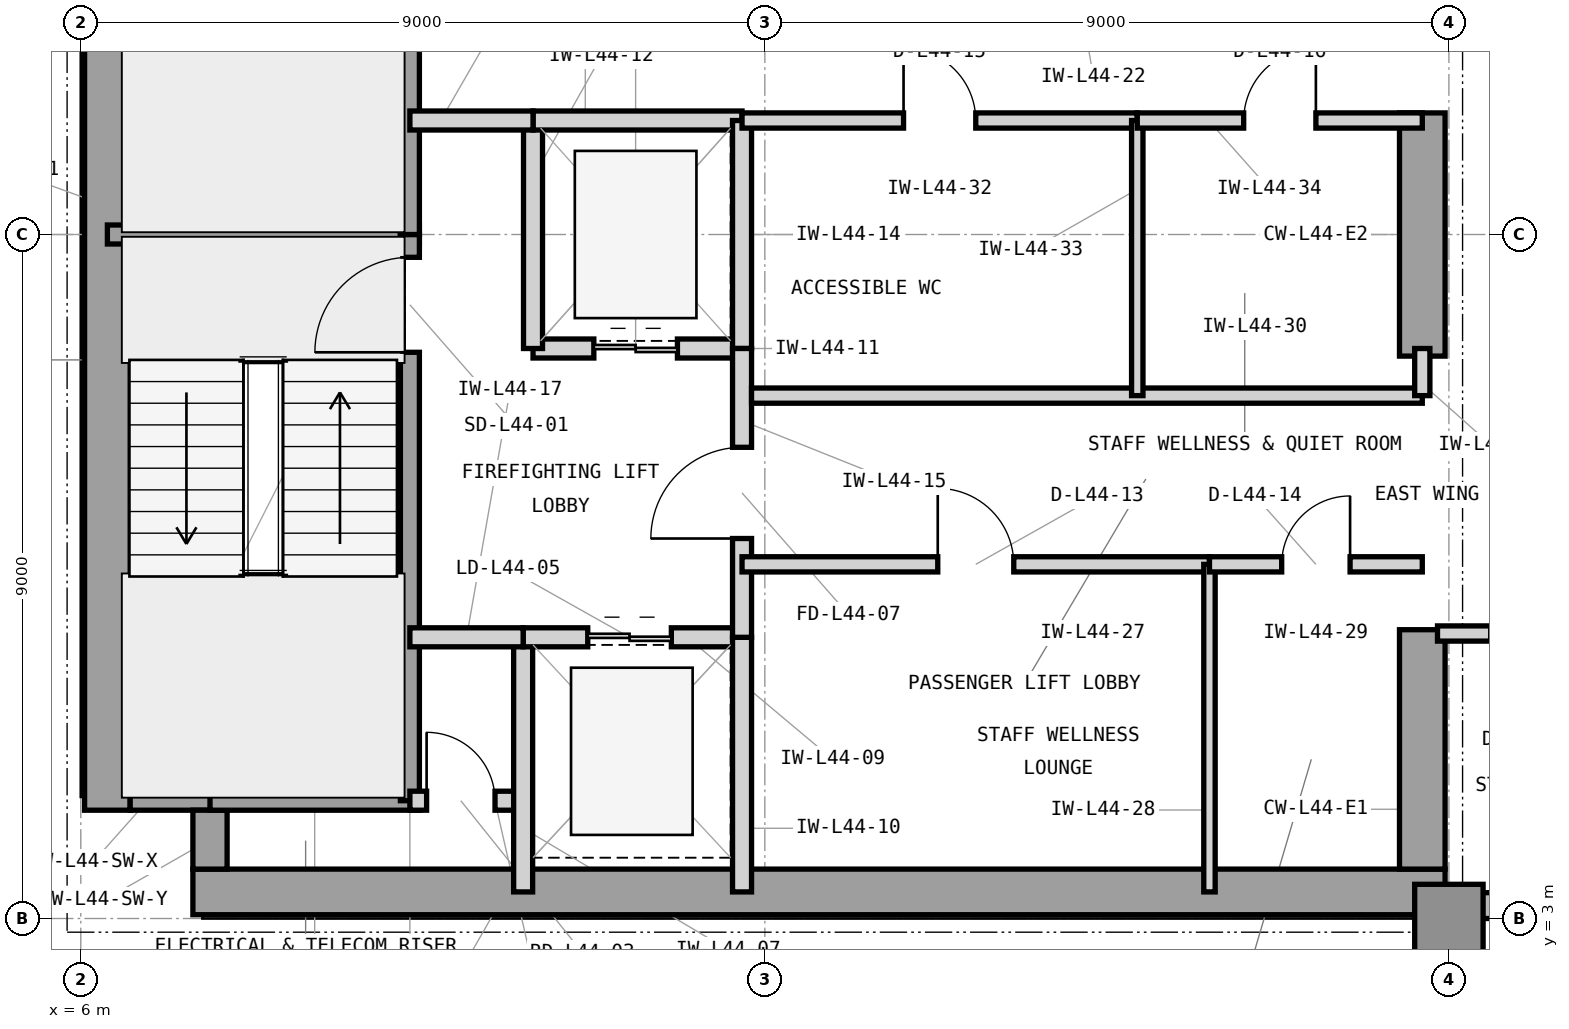
"""IFC4 building model, lengths in metres.
Left out: names, types, materials, properties, quantities, classifications, styles, units other than length and angle.
Written with IfcOpenShell. Run it as: python <this file> out.ifc"""

import sys

from ifc_helpers import new_model, si_unit, direction, frame, frame_2d, origin, origin_2d, place, context, subcontext, project, spatial, rectangle, extrude, element, fill, save


model = new_model("IFC4")
c1 = context("Model", 3, precision=1e-05, world=origin(), true_north=direction((0.0, 1.0)))
c2 = subcontext(c1, "Body", "Model", "MODEL_VIEW")
j1 = project(units=[si_unit("LENGTHUNIT", "METRE"), si_unit("PLANEANGLEUNIT", "RADIAN")], contexts=[c1])
p1 = place(None, origin())
s1 = spatial("IfcSite", under=j1, at=p1, CompositionType="ELEMENT")
p2 = place(p1, origin())
s2 = spatial("IfcBuilding", under=s1, at=p2, CompositionType="ELEMENT")
p3 = place(p2, frame((0.0, 0.0, 183.9)))
s3 = spatial("IfcBuildingStorey", under=s2, at=p3, CompositionType="ELEMENT", Elevation=183.9)
p4 = place(p3, frame((7.475, 3.35, 0.0), z_axis=(0.0, 0.0, 1.0), x_axis=(1.0, 0.0, 0.0)))
e1 = element("IfcWall", 1, at=p4, inside=s3, PredefinedType="SHEAR", context=c2, shape_type="SweptSolid", body=[
    extrude(rectangle(XDim=16.475, YDim=0.6, at=frame_2d((8.237, 0.0))), origin(), (0.0, 0.0, 1.0), 3.9),
])
p5 = place(p3, frame((6.35, 4.425, 0.0), z_axis=(0.0, 0.0, 1.0), x_axis=(0.0, 1.0, 0.0)))
e2 = element("IfcWall", 2, at=p5, inside=s3, PredefinedType="SHEAR", context=c2, shape_type="SweptSolid", body=[
    extrude(rectangle(XDim=15.15, YDim=0.6, at=frame_2d((7.575, 0.0))), origin(), (0.0, 0.0, 1.0), 3.9),
])
p6 = place(p3, frame((23.65, 3.65, 0.0), z_axis=(0.0, 0.0, 1.0), x_axis=(0.0, 1.0, 0.0)))
e3 = element("IfcWall", 3, at=p6, inside=s3, PredefinedType="SHEAR", context=c2, shape_type="SweptSolid", body=[
    extrude(rectangle(XDim=3.15, YDim=0.6, at=frame_2d((1.575, 0.0))), origin(), (0.0, 0.0, 1.0), 3.9),
])
p7 = place(p3, frame((23.65, 10.4, 0.0), z_axis=(0.0, 0.0, 1.0), x_axis=(0.0, 1.0, 0.0)))
e4 = element("IfcWall", 4, at=p7, inside=s3, PredefinedType="SHEAR", context=c2, shape_type="SweptSolid", body=[
    extrude(rectangle(XDim=3.2, YDim=0.6, at=frame_2d((1.6, 0.0))), origin(), (0.0, 0.0, 1.0), 3.9),
])
p8 = place(p3, frame((6.65, 4.65, 0.0), z_axis=(0.0, 0.0, 1.0), x_axis=(1.0, 0.0, 0.0)))
e5 = element("IfcWall", 5, at=p8, inside=s3, PredefinedType="SHEAR", context=c2, shape_type="SweptSolid", body=[
    extrude(rectangle(XDim=1.275, YDim=0.45, at=frame_2d((0.638, 0.0))), origin(), (0.0, 0.0, 1.0), 3.9),
])
p9 = place(p3, frame((7.7, 3.65, 0.0), z_axis=(0.0, 0.0, 1.0), x_axis=(0.0, 1.0, 0.0)))
e6 = element("IfcWall", 6, at=p9, inside=s3, PredefinedType="SHEAR", context=c2, shape_type="SweptSolid", body=[
    extrude(rectangle(XDim=0.775, YDim=0.45, at=frame_2d((0.388, 0.0))), origin(), (0.0, 0.0, 1.0), 3.9),
])
p10 = place(p3, frame((24.0, 3.0, 0.0), z_axis=(0.0, 0.0, 1.0), x_axis=(1.0, 0.0, 0.0)))
e7 = element("IfcColumn", 7, at=p10, inside=s3, PredefinedType="COLUMN", context=c2, shape_type="SweptSolid", body=[
    extrude(rectangle(XDim=0.9, YDim=0.9, at=origin_2d()), origin(), (0.0, 0.0, 1.0), 3.9),
])
p11 = place(p3, frame((23.9, 3.17, 0.0), z_axis=(0.0, 0.0, 1.0), x_axis=(1.0, 0.0, 0.0)))
e8 = element("IfcWall", 8, at=p11, inside=s3, PredefinedType="STANDARD", context=c2, shape_type="SweptSolid", body=[
    extrude(rectangle(XDim=31.5, YDim=0.34, at=frame_2d((15.75, 0.0))), origin(), (0.0, 0.0, 1.0), 3.7),
])
p12 = place(p11, frame((5.6, 0.0, 0.9)))
e9 = element("IfcOpeningElement", 9, at=p12, cuts=e8, PredefinedType="OPENING", context=c2, shape_type="SweptSolid", body=[
    extrude(rectangle(XDim=2.3, YDim=2.2, at=frame_2d((1.15, 1.1))), frame((0.0, 0.18, 0.0), z_axis=(0.0, -1.0, 0.0), x_axis=(1.0, 0.0, 0.0)), (0.0, 0.0, 1.0), 0.36),
])
p13 = place(p11, frame((14.6, 0.0, 0.9)))
e10 = element("IfcOpeningElement", 10, at=p13, cuts=e8, PredefinedType="OPENING", context=c2, shape_type="SweptSolid", body=[
    extrude(rectangle(XDim=2.3, YDim=2.2, at=frame_2d((1.15, 1.1))), frame((0.0, 0.18, 0.0), z_axis=(0.0, -1.0, 0.0), x_axis=(1.0, 0.0, 0.0)), (0.0, 0.0, 1.0), 0.36),
])
p14 = place(p11, frame((19.1, 0.0, 0.9)))
e11 = element("IfcOpeningElement", 11, at=p14, cuts=e8, PredefinedType="OPENING", context=c2, shape_type="SweptSolid", body=[
    extrude(rectangle(XDim=2.3, YDim=2.2, at=frame_2d((1.15, 1.1))), frame((0.0, 0.18, 0.0), z_axis=(0.0, -1.0, 0.0), x_axis=(1.0, 0.0, 0.0)), (0.0, 0.0, 1.0), 0.36),
])
p15 = place(p11, frame((0.9, 0.0, 0.9)))
e12 = element("IfcOpeningElement", 12, at=p15, cuts=e8, PredefinedType="OPENING", context=c2, shape_type="SweptSolid", body=[
    extrude(rectangle(XDim=1.6, YDim=2.2, at=frame_2d((0.8, 1.1))), frame((0.0, 0.18, 0.0), z_axis=(0.0, -1.0, 0.0), x_axis=(1.0, 0.0, 0.0)), (0.0, 0.0, 1.0), 0.36),
])
p16 = place(p3, frame((6.35, 12.0, 0.0), z_axis=(0.0, 0.0, 1.0), x_axis=(1.0, 0.0, 0.0)))
e13 = element("IfcWall", 13, at=p16, inside=s3, PredefinedType="SHEAR", context=c2, shape_type="SweptSolid", body=[
    extrude(rectangle(XDim=4.105, YDim=0.25, at=frame_2d((2.052, 0.0))), origin(), (0.0, 0.0, 1.0), 3.9),
])
p17 = place(p3, frame((7.7, 4.55, 0.0), z_axis=(0.0, 0.0, 1.0), x_axis=(1.0, 0.0, 0.0)))
e14 = element("IfcWall", 14, at=p17, inside=s3, PredefinedType="SHEAR", context=c2, shape_type="SweptSolid", body=[
    extrude(rectangle(XDim=2.755, YDim=0.25, at=frame_2d((1.377, 0.0))), origin(), (0.0, 0.0, 1.0), 3.9),
])
p18 = place(p3, frame((10.33, 4.55, 0.0), z_axis=(0.0, 0.0, 1.0), x_axis=(0.0, 1.0, 0.0)))
e15 = element("IfcWall", 15, at=p18, inside=s3, PredefinedType="SHEAR", context=c2, shape_type="SweptSolid", body=[
    extrude(rectangle(XDim=7.45, YDim=0.25, at=frame_2d((3.725, 0.0))), origin(), (0.0, 0.0, 1.0), 3.9),
])
p19 = place(p18, frame((5.9, 0.0, 0.0)))
e16 = element("IfcOpeningElement", 16, at=p19, cuts=e15, PredefinedType="OPENING", context=c2, shape_type="SweptSolid", body=[
    extrude(rectangle(XDim=1.25, YDim=2.2, at=frame_2d((0.625, 1.1))), frame((0.0, 0.135, 0.0), z_axis=(0.0, -1.0, 0.0), x_axis=(1.0, 0.0, 0.0)), (0.0, 0.0, 1.0), 0.27),
])
p20 = place(p3, frame((10.33, 12.0, 0.0), z_axis=(0.0, 0.0, 1.0), x_axis=(0.0, 1.0, 0.0)))
e17 = element("IfcWall", 17, at=p20, inside=s3, PredefinedType="SHEAR", context=c2, shape_type="SweptSolid", body=[
    extrude(rectangle(XDim=7.45, YDim=0.25, at=frame_2d((3.725, 0.0))), origin(), (0.0, 0.0, 1.0), 3.9),
])
p21 = place(p20, frame((5.85, 0.0, 0.0)))
e18 = element("IfcOpeningElement", 18, at=p21, cuts=e17, PredefinedType="OPENING", context=c2, shape_type="SweptSolid", body=[
    extrude(rectangle(XDim=1.25, YDim=2.2, at=frame_2d((0.625, 1.1))), frame((0.0, 0.135, 0.0), z_axis=(0.0, -1.0, 0.0), x_axis=(1.0, 0.0, 0.0)), (0.0, 0.0, 1.0), 0.27),
])
p22 = place(p3, frame((10.33, 4.55, 0.0), z_axis=(0.0, 0.0, 1.0), x_axis=(1.0, 0.0, 0.0)))
e19 = element("IfcWall", 19, at=p22, inside=s3, PredefinedType="PARTITIONING", context=c2, shape_type="SweptSolid", body=[
    extrude(rectangle(XDim=1.49, YDim=0.25, at=frame_2d((0.745, 0.0))), origin(), (0.0, 0.0, 1.0), 3.69),
])
p23 = place(p22, frame((0.22, 0.0, 0.0)))
e20 = element("IfcOpeningElement", 20, at=p23, cuts=e19, PredefinedType="OPENING", context=c2, shape_type="SweptSolid", body=[
    extrude(rectangle(XDim=0.9, YDim=2.1, at=frame_2d((0.45, 1.05))), frame((0.0, 0.135, 0.0), z_axis=(0.0, -1.0, 0.0), x_axis=(1.0, 0.0, 0.0)), (0.0, 0.0, 1.0), 0.27),
])
p24 = place(p3, frame((11.82, 3.35, 0.0), z_axis=(0.0, 0.0, 1.0), x_axis=(0.0, 1.0, 0.0)))
e21 = element("IfcWall", 21, at=p24, inside=s3, PredefinedType="PARTITIONING", context=c2, shape_type="SweptSolid", body=[
    extrude(rectangle(XDim=3.35, YDim=0.25, at=frame_2d((1.675, 0.0))), origin(), (0.0, 0.0, 1.0), 3.69),
])
p25 = place(p3, frame((11.82, 6.7, 0.0), z_axis=(0.0, 0.0, 1.0), x_axis=(1.0, 0.0, 0.0)))
e22 = element("IfcWall", 22, at=p25, inside=s3, PredefinedType="PARTITIONING", context=c2, shape_type="SweptSolid", body=[
    extrude(rectangle(XDim=2.88, YDim=0.25, at=frame_2d((1.44, 0.0))), origin(), (0.0, 0.0, 1.0), 3.283),
])
p26 = place(p25, frame((0.85, 0.0, 0.0)))
e23 = element("IfcOpeningElement", 23, at=p26, cuts=e22, PredefinedType="OPENING", context=c2, shape_type="SweptSolid", body=[
    extrude(rectangle(XDim=1.1, YDim=2.25, at=frame_2d((0.55, 1.125))), frame((0.0, 0.135, 0.0), z_axis=(0.0, -1.0, 0.0), x_axis=(1.0, 0.0, 0.0)), (0.0, 0.0, 1.0), 0.27),
])
p27 = place(p3, frame((14.7, 3.35, 0.0), z_axis=(0.0, 0.0, 1.0), x_axis=(0.0, 1.0, 0.0)))
e24 = element("IfcWall", 24, at=p27, inside=s3, PredefinedType="PARTITIONING", context=c2, shape_type="SweptSolid", body=[
    extrude(rectangle(XDim=3.35, YDim=0.25, at=frame_2d((1.675, 0.0))), origin(), (0.0, 0.0, 1.0), 3.69),
])
p28 = place(p3, frame((11.95, 10.5, 0.0), z_axis=(0.0, 0.0, 1.0), x_axis=(1.0, 0.0, 0.0)))
e25 = element("IfcWall", 25, at=p28, inside=s3, PredefinedType="PARTITIONING", context=c2, shape_type="SweptSolid", body=[
    extrude(rectangle(XDim=2.75, YDim=0.25, at=frame_2d((1.375, 0.0))), origin(), (0.0, 0.0, 1.0), 3.283),
])
p29 = place(p28, frame((0.8, 0.0, 0.0)))
e26 = element("IfcOpeningElement", 26, at=p29, cuts=e25, PredefinedType="OPENING", context=c2, shape_type="SweptSolid", body=[
    extrude(rectangle(XDim=1.1, YDim=2.25, at=frame_2d((0.55, 1.125))), frame((0.0, 0.135, 0.0), z_axis=(0.0, -1.0, 0.0), x_axis=(1.0, 0.0, 0.0)), (0.0, 0.0, 1.0), 0.27),
])
p30 = place(p3, frame((11.95, 10.5, 0.0), z_axis=(0.0, 0.0, 1.0), x_axis=(0.0, 1.0, 0.0)))
e27 = element("IfcWall", 27, at=p30, inside=s3, PredefinedType="PARTITIONING", context=c2, shape_type="SweptSolid", body=[
    extrude(rectangle(XDim=3.0, YDim=0.25, at=frame_2d((1.5, 0.0))), origin(), (0.0, 0.0, 1.0), 3.69),
])
p31 = place(p3, frame((11.95, 13.5, 0.0), z_axis=(0.0, 0.0, 1.0), x_axis=(1.0, 0.0, 0.0)))
e28 = element("IfcWall", 28, at=p31, inside=s3, PredefinedType="PARTITIONING", context=c2, shape_type="SweptSolid", body=[
    extrude(rectangle(XDim=2.75, YDim=0.25, at=frame_2d((1.375, 0.0))), origin(), (0.0, 0.0, 1.0), 3.283),
])
p32 = place(p3, frame((14.7, 10.5, 0.0), z_axis=(0.0, 0.0, 1.0), x_axis=(0.0, 1.0, 0.0)))
e29 = element("IfcWall", 29, at=p32, inside=s3, PredefinedType="PARTITIONING", context=c2, shape_type="SweptSolid", body=[
    extrude(rectangle(XDim=3.0, YDim=0.25, at=frame_2d((1.5, 0.0))), origin(), (0.0, 0.0, 1.0), 3.69),
])
p33 = place(p3, frame((14.7, 6.7, 0.0), z_axis=(0.0, 0.0, 1.0), x_axis=(0.0, 1.0, 0.0)))
e30 = element("IfcWall", 30, at=p33, inside=s3, PredefinedType="PARTITIONING", context=c2, shape_type="SweptSolid", body=[
    extrude(rectangle(XDim=3.8, YDim=0.25, at=frame_2d((1.9, 0.0))), origin(), (0.0, 0.0, 1.0), 3.69),
])
p34 = place(p33, frame((1.3, 0.0, 0.0)))
e31 = element("IfcOpeningElement", 31, at=p34, cuts=e30, PredefinedType="OPENING", context=c2, shape_type="SweptSolid", body=[
    extrude(rectangle(XDim=1.2, YDim=2.2, at=frame_2d((0.6, 1.1))), frame((0.0, 0.135, 0.0), z_axis=(0.0, -1.0, 0.0), x_axis=(1.0, 0.0, 0.0)), (0.0, 0.0, 1.0), 0.27),
])
p35 = place(p3, frame((10.33, 13.5, 0.0), z_axis=(0.0, 0.0, 1.0), x_axis=(1.0, 0.0, 0.0)))
e32 = element("IfcWall", 32, at=p35, inside=s3, PredefinedType="PARTITIONING", context=c2, shape_type="SweptSolid", body=[
    extrude(rectangle(XDim=1.62, YDim=0.25, at=frame_2d((0.81, 0.0))), origin(), (0.0, 0.0, 1.0), 3.283),
])
p36 = place(p3, frame((10.33, 6.7, 0.0), z_axis=(0.0, 0.0, 1.0), x_axis=(1.0, 0.0, 0.0)))
e33 = element("IfcWall", 33, at=p36, inside=s3, PredefinedType="PARTITIONING", context=c2, shape_type="SweptSolid", body=[
    extrude(rectangle(XDim=1.49, YDim=0.25, at=frame_2d((0.745, 0.0))), origin(), (0.0, 0.0, 1.0), 3.283),
])
p37 = place(p3, frame((14.7, 7.66, 0.0), z_axis=(0.0, 0.0, 1.0), x_axis=(1.0, 0.0, 0.0)))
e34 = element("IfcWall", 34, at=p37, inside=s3, PredefinedType="PARTITIONING", context=c2, shape_type="SweptSolid", body=[
    extrude(rectangle(XDim=6.15, YDim=0.2, at=frame_2d((3.075, 0.0))), origin(), (0.0, 0.0, 1.0), 3.69),
])
p38 = place(p37, frame((2.575, 0.0, 0.0)))
e35 = element("IfcOpeningElement", 35, at=p38, cuts=e34, PredefinedType="OPENING", context=c2, shape_type="SweptSolid", body=[
    extrude(rectangle(XDim=1.0, YDim=2.15, at=frame_2d((0.5, 1.075))), frame((0.0, 0.11, 0.0), z_axis=(0.0, -1.0, 0.0), x_axis=(1.0, 0.0, 0.0)), (0.0, 0.0, 1.0), 0.22),
])
p39 = place(p3, frame((20.85, 3.35, 0.0), z_axis=(0.0, 0.0, 1.0), x_axis=(0.0, 1.0, 0.0)))
e36 = element("IfcWall", 36, at=p39, inside=s3, PredefinedType="PARTITIONING", context=c2, shape_type="SweptSolid", body=[
    extrude(rectangle(XDim=4.31, YDim=0.15, at=frame_2d((2.155, 0.0))), origin(), (0.0, 0.0, 1.0), 3.69),
])
p40 = place(p3, frame((20.85, 7.66, 0.0), z_axis=(0.0, 0.0, 1.0), x_axis=(1.0, 0.0, 0.0)))
e37 = element("IfcWall", 37, at=p40, inside=s3, PredefinedType="PARTITIONING", context=c2, shape_type="SweptSolid", body=[
    extrude(rectangle(XDim=2.8, YDim=0.2, at=frame_2d((1.4, 0.0))), origin(), (0.0, 0.0, 1.0), 3.69),
])
p41 = place(p40, frame((0.95, 0.0, 0.0)))
e38 = element("IfcOpeningElement", 38, at=p41, cuts=e37, PredefinedType="OPENING", context=c2, shape_type="SweptSolid", body=[
    extrude(rectangle(XDim=0.9, YDim=2.1, at=frame_2d((0.45, 1.05))), frame((0.0, 0.11, 0.0), z_axis=(0.0, -1.0, 0.0), x_axis=(1.0, 0.0, 0.0)), (0.0, 0.0, 1.0), 0.22),
])
p42 = place(p3, frame((14.825, 9.88, 0.0), z_axis=(0.0, 0.0, 1.0), x_axis=(1.0, 0.0, 0.0)))
e39 = element("IfcWall", 39, at=p42, inside=s3, PredefinedType="PARTITIONING", context=c2, shape_type="SweptSolid", body=[
    extrude(rectangle(XDim=8.825, YDim=0.2, at=frame_2d((4.413, 0.0))), origin(), (0.0, 0.0, 1.0), 3.69),
])
p43 = place(p3, frame((23.65, 9.88, 0.0), z_axis=(0.0, 0.0, 1.0), x_axis=(0.0, 1.0, 0.0)))
e40 = element("IfcWall", 40, at=p43, inside=s3, PredefinedType="PARTITIONING", context=c2, shape_type="SweptSolid", body=[
    extrude(rectangle(XDim=0.62, YDim=0.2, at=frame_2d((0.31, 0.0))), origin(), (0.0, 0.0, 1.0), 3.69),
])
p44 = place(p3, frame((14.7, 13.5, 0.0), z_axis=(0.0, 0.0, 1.0), x_axis=(1.0, 0.0, 0.0)))
e41 = element("IfcWall", 41, at=p44, inside=s3, PredefinedType="PARTITIONING", context=c2, shape_type="SweptSolid", body=[
    extrude(rectangle(XDim=5.2, YDim=0.2, at=frame_2d((2.6, 0.0))), origin(), (0.0, 0.0, 1.0), 3.283),
])
p45 = place(p44, frame((2.125, 0.0, 0.0)))
e42 = element("IfcOpeningElement", 42, at=p45, cuts=e41, PredefinedType="OPENING", context=c2, shape_type="SweptSolid", body=[
    extrude(rectangle(XDim=0.95, YDim=2.1, at=frame_2d((0.475, 1.05))), frame((0.0, 0.11, 0.0), z_axis=(0.0, -1.0, 0.0), x_axis=(1.0, 0.0, 0.0)), (0.0, 0.0, 1.0), 0.22),
])
p46 = place(p3, frame((19.9, 9.88, 0.0), z_axis=(0.0, 0.0, 1.0), x_axis=(0.0, 1.0, 0.0)))
e43 = element("IfcWall", 43, at=p46, inside=s3, PredefinedType="PARTITIONING", context=c2, shape_type="SweptSolid", body=[
    extrude(rectangle(XDim=3.62, YDim=0.15, at=frame_2d((1.81, 0.0))), origin(), (0.0, 0.0, 1.0), 3.69),
])
p47 = place(p3, frame((19.9, 13.5, 0.0), z_axis=(0.0, 0.0, 1.0), x_axis=(1.0, 0.0, 0.0)))
e44 = element("IfcWall", 44, at=p47, inside=s3, PredefinedType="PARTITIONING", context=c2, shape_type="SweptSolid", body=[
    extrude(rectangle(XDim=3.75, YDim=0.2, at=frame_2d((1.875, 0.0))), origin(), (0.0, 0.0, 1.0), 3.283),
])
p48 = place(p47, frame((1.4, 0.0, 0.0)))
e45 = element("IfcOpeningElement", 45, at=p48, cuts=e44, PredefinedType="OPENING", context=c2, shape_type="SweptSolid", body=[
    extrude(rectangle(XDim=0.95, YDim=2.1, at=frame_2d((0.475, 1.05))), frame((0.0, 0.11, 0.0), z_axis=(0.0, -1.0, 0.0), x_axis=(1.0, 0.0, 0.0)), (0.0, 0.0, 1.0), 0.22),
])
p49 = place(p3, frame((23.85, 6.75, 0.0), z_axis=(0.0, 0.0, 1.0), x_axis=(1.0, 0.0, 0.0)))
e46 = element("IfcWall", 46, at=p49, inside=s3, PredefinedType="PARTITIONING", context=c2, shape_type="SweptSolid", body=[
    extrude(rectangle(XDim=2.85, YDim=0.2, at=frame_2d((1.425, 0.0))), origin(), (0.0, 0.0, 1.0), 3.69),
])
p50 = place(p49, frame((0.7, 0.0, 0.0)))
e47 = element("IfcOpeningElement", 47, at=p50, cuts=e46, PredefinedType="OPENING", context=c2, shape_type="SweptSolid", body=[
    extrude(rectangle(XDim=1.0, YDim=2.15, at=frame_2d((0.5, 1.075))), frame((0.0, 0.11, 0.0), z_axis=(0.0, -1.0, 0.0), x_axis=(1.0, 0.0, 0.0)), (0.0, 0.0, 1.0), 0.22),
])
p51 = place(p19, origin())
e48 = element("IfcDoor", 48, at=p51, inside=s3, OperationType="SINGLE_SWING_LEFT", PredefinedType="DOOR", context=c2, shape_type="SweptSolid", body=[
    extrude(rectangle(XDim=1.25, YDim=2.2, at=frame_2d((0.625, 1.1))), frame((0.0, 0.025, 0.0), z_axis=(0.0, -1.0, 0.0), x_axis=(1.0, 0.0, 0.0)), (0.0, 0.0, 1.0), 0.05),
])
fill(e16, e48)
p52 = place(p23, origin())
e49 = element("IfcDoor", 49, at=p52, inside=s3, OperationType="SINGLE_SWING_LEFT", PredefinedType="TRAPDOOR", context=c2, shape_type="SweptSolid", body=[
    extrude(rectangle(XDim=0.9, YDim=2.1, at=frame_2d((0.45, 1.05))), frame((0.0, 0.025, 0.0), z_axis=(0.0, -1.0, 0.0), x_axis=(1.0, 0.0, 0.0)), (0.0, 0.0, 1.0), 0.05),
])
fill(e20, e49)
p53 = place(p26, origin())
e50 = element("IfcDoor", 50, at=p53, inside=s3, OperationType="DOUBLE_DOOR_SLIDING", PredefinedType="DOOR", context=c2, shape_type="SweptSolid", body=[
    extrude(rectangle(XDim=1.1, YDim=2.25, at=frame_2d((0.55, 1.125))), frame((0.0, 0.025, 0.0), z_axis=(0.0, -1.0, 0.0), x_axis=(1.0, 0.0, 0.0)), (0.0, 0.0, 1.0), 0.05),
])
fill(e23, e50)
p54 = place(p29, origin())
e51 = element("IfcDoor", 51, at=p54, inside=s3, OperationType="DOUBLE_DOOR_SLIDING", PredefinedType="DOOR", context=c2, shape_type="SweptSolid", body=[
    extrude(rectangle(XDim=1.1, YDim=2.25, at=frame_2d((0.55, 1.125))), frame((0.0, 0.025, 0.0), z_axis=(0.0, -1.0, 0.0), x_axis=(1.0, 0.0, 0.0)), (0.0, 0.0, 1.0), 0.05),
])
fill(e26, e51)
p55 = place(p34, origin())
e52 = element("IfcDoor", 52, at=p55, inside=s3, OperationType="SINGLE_SWING_LEFT", PredefinedType="DOOR", context=c2, shape_type="SweptSolid", body=[
    extrude(rectangle(XDim=1.2, YDim=2.2, at=frame_2d((0.6, 1.1))), frame((0.0, 0.025, 0.0), z_axis=(0.0, -1.0, 0.0), x_axis=(1.0, 0.0, 0.0)), (0.0, 0.0, 1.0), 0.05),
])
fill(e31, e52)
p56 = place(p38, origin())
e53 = element("IfcDoor", 53, at=p56, inside=s3, OperationType="SINGLE_SWING_LEFT", PredefinedType="DOOR", context=c2, shape_type="SweptSolid", body=[
    extrude(rectangle(XDim=1.0, YDim=2.15, at=frame_2d((0.5, 1.075))), frame((0.0, 0.025, 0.0), z_axis=(0.0, -1.0, 0.0), x_axis=(1.0, 0.0, 0.0)), (0.0, 0.0, 1.0), 0.05),
])
fill(e35, e53)
p57 = place(p41, origin())
e54 = element("IfcDoor", 54, at=p57, inside=s3, OperationType="SINGLE_SWING_RIGHT", PredefinedType="TRAPDOOR", context=c2, shape_type="SweptSolid", body=[
    extrude(rectangle(XDim=0.9, YDim=2.1, at=frame_2d((0.45, 1.05))), frame((0.0, 0.025, 0.0), z_axis=(0.0, -1.0, 0.0), x_axis=(1.0, 0.0, 0.0)), (0.0, 0.0, 1.0), 0.05),
])
fill(e38, e54)
p58 = place(p45, origin())
e55 = element("IfcDoor", 55, at=p58, inside=s3, OperationType="SINGLE_SWING_LEFT", PredefinedType="DOOR", context=c2, shape_type="SweptSolid", body=[
    extrude(rectangle(XDim=0.95, YDim=2.1, at=frame_2d((0.475, 1.05))), frame((0.0, 0.025, 0.0), z_axis=(0.0, -1.0, 0.0), x_axis=(1.0, 0.0, 0.0)), (0.0, 0.0, 1.0), 0.05),
])
fill(e42, e55)
p59 = place(p48, origin())
e56 = element("IfcDoor", 56, at=p59, inside=s3, OperationType="SINGLE_SWING_RIGHT", PredefinedType="DOOR", context=c2, shape_type="SweptSolid", body=[
    extrude(rectangle(XDim=0.95, YDim=2.1, at=frame_2d((0.475, 1.05))), frame((0.0, 0.025, 0.0), z_axis=(0.0, -1.0, 0.0), x_axis=(1.0, 0.0, 0.0)), (0.0, 0.0, 1.0), 0.05),
])
fill(e45, e56)
save(model, sys.argv[1])
